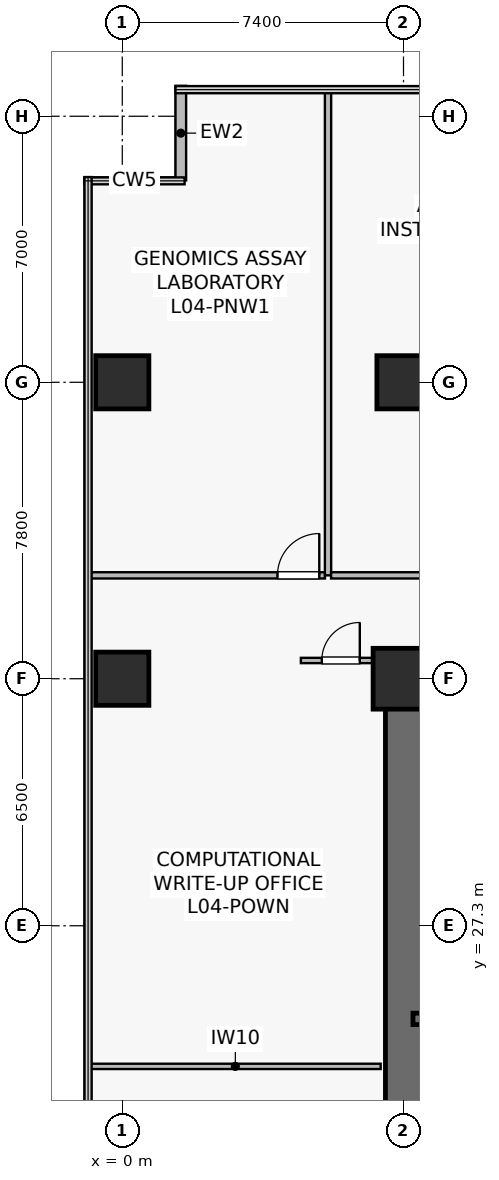
"""IFC4 building model, lengths in metres.
Left out: names, types, materials, properties, quantities, classifications, styles, units other than length and angle.
Written with IfcOpenShell. Run it as: python <this file> out.ifc"""

import sys

from ifc_helpers import new_model, si_unit, direction, frame, frame_2d, origin, origin_2d, place, context, subcontext, project, spatial, rectangle, extrude, source, transform, mapped, element, fill, save


model = new_model("IFC4")
c1 = context("Model", 3, precision=1e-05, world=origin(), true_north=direction((0.0, 1.0)))
c2 = subcontext(c1, "Body", "Model", "MODEL_VIEW")
j1 = project(units=[si_unit("LENGTHUNIT", "METRE"), si_unit("PLANEANGLEUNIT", "RADIAN")], contexts=[c1])
p1 = place(None, origin())
s1 = spatial("IfcSite", under=j1, at=p1, CompositionType="ELEMENT")
p2 = place(p1, origin())
s2 = spatial("IfcBuilding", under=s1, at=p2, CompositionType="ELEMENT")
p3 = place(p2, frame((0.0, 0.0, 15.0)))
s3 = spatial("IfcBuildingStorey", under=s2, at=p3, CompositionType="ELEMENT", Elevation=15.0)
p4 = place(p3, frame((6.925, 33.8, 0.0), z_axis=(0.0, 0.0, 1.0), x_axis=(1.0, 0.0, 0.0)))
e1 = element("IfcWall", 1, at=p4, inside=s3, PredefinedType="SHEAR", context=c2, shape_type="SweptSolid", body=[
    extrude(rectangle(XDim=15.75, YDim=0.95, at=frame_2d((7.875, 0.0))), origin(), (0.0, 0.0, 1.0), 4.45),
])
p5 = place(p4, frame((5.4, 0.0, 0.0)))
e2 = element("IfcOpeningElement", 2, at=p5, cuts=e1, PredefinedType="OPENING", context=c2, shape_type="SweptSolid", body=[
    extrude(rectangle(XDim=0.95, YDim=2.15, at=frame_2d((0.475, 1.075))), frame((0.0, 0.485, 0.0), z_axis=(0.0, -1.0, 0.0), x_axis=(1.0, 0.0, 0.0)), (0.0, 0.0, 1.0), 0.97),
])
p6 = place(p4, frame((7.915, 0.0, 0.0)))
e3 = element("IfcOpeningElement", 3, at=p6, cuts=e1, PredefinedType="OPENING", context=c2, shape_type="SweptSolid", body=[
    extrude(rectangle(XDim=0.95, YDim=2.15, at=frame_2d((0.475, 1.075))), frame((0.0, 0.485, 0.0), z_axis=(0.0, -1.0, 0.0), x_axis=(1.0, 0.0, 0.0)), (0.0, 0.0, 1.0), 0.97),
])
p7 = place(p4, frame((10.465, 0.0, 0.0)))
e4 = element("IfcOpeningElement", 4, at=p7, cuts=e1, PredefinedType="OPENING", context=c2, shape_type="SweptSolid", body=[
    extrude(rectangle(XDim=0.95, YDim=2.15, at=frame_2d((0.475, 1.075))), frame((0.0, 0.485, 0.0), z_axis=(0.0, -1.0, 0.0), x_axis=(1.0, 0.0, 0.0)), (0.0, 0.0, 1.0), 0.97),
])
p8 = place(p4, frame((13.015, 0.0, 0.0)))
e5 = element("IfcOpeningElement", 5, at=p8, cuts=e1, PredefinedType="OPENING", context=c2, shape_type="SweptSolid", body=[
    extrude(rectangle(XDim=0.95, YDim=2.15, at=frame_2d((0.475, 1.075))), frame((0.0, 0.485, 0.0), z_axis=(0.0, -1.0, 0.0), x_axis=(1.0, 0.0, 0.0)), (0.0, 0.0, 1.0), 0.97),
])
p9 = place(p3, frame((7.4, 15.275, 0.0), z_axis=(0.0, 0.0, 1.0), x_axis=(0.0, 1.0, 0.0)))
e6 = element("IfcWall", 6, at=p9, inside=s3, PredefinedType="SHEAR", context=c2, shape_type="SweptSolid", body=[
    extrude(rectangle(XDim=18.05, YDim=0.95, at=frame_2d((9.025, 0.0))), origin(), (0.0, 0.0, 1.0), 4.45),
])
p10 = place(p3, frame((7.65, 24.85, 0.0), z_axis=(0.0, 0.0, 1.0), x_axis=(1.0, 0.0, 0.0)))
e7 = element("IfcWall", 7, at=p10, inside=s3, PredefinedType="SHEAR", context=c2, shape_type="SweptSolid", body=[
    extrude(rectangle(XDim=3.8, YDim=0.3, at=frame_2d((1.9, 0.0))), origin(), (0.0, 0.0, 1.0), 4.45),
])
m1 = source(origin(), c2, "Body", "SweptSolid", [
    extrude(rectangle(XDim=1.6, YDim=1.6, at=origin_2d()), origin(), (0.0, 0.0, 1.0), 4.8),
])
p11 = place(p3, frame((7.4, 33.8, 0.0), z_axis=(0.0, 0.0, 1.0), x_axis=(1.0, 0.0, 0.0)))
e8 = element("IfcColumn", 8, at=p11, inside=s3, PredefinedType="COLUMN", context=c2, shape_type="MappedRepresentation", body=[
    mapped(m1, transform((0.0, 0.0, 0.0), scale=1.0)),
])
m2 = source(origin(), c2, "Body", "SweptSolid", [
    extrude(rectangle(XDim=1.4, YDim=1.4, at=origin_2d()), origin(), (0.0, 0.0, 1.0), 4.8),
])
for number, where, z_axis, x_axis in (
    (9, (7.4, 41.6, 0.0), (0.0, 0.0, 1.0), (1.0, 0.0, 0.0)),
    (10, (0.0, 33.8, 0.0), (0.0, 0.0, 1.0), (1.0, 0.0, 0.0)),
    (11, (0.0, 41.6, 0.0), (0.0, 0.0, 1.0), (1.0, 0.0, 0.0)),
):
    element("IfcColumn", number, at=place(p3, frame(where, z_axis=z_axis, x_axis=x_axis)), inside=s3, PredefinedType="COLUMN", context=c2, shape_type="MappedRepresentation", body=[
        mapped(m2, transform((0.0, 0.0, 0.0), scale=1.0)),
    ])
p12 = place(p3, frame((1.54, 49.4, 0.0), z_axis=(0.0, 0.0, 1.0), x_axis=(0.0, -1.0, 0.0)))
e12 = element("IfcWall", 12, at=p12, inside=s3, PredefinedType="STANDARD", context=c2, shape_type="SweptSolid", body=[
    extrude(rectangle(XDim=2.488, YDim=0.28, at=frame_2d((1.244, 0.0))), origin(), (0.0, 0.0, 1.0), 4.45),
])
p13 = place(p3, frame((-0.85, 23.6, 0.0), z_axis=(0.0, 0.0, 1.0), x_axis=(1.0, 0.0, 0.0)))
e13 = element("IfcWall", 13, at=p13, inside=s3, PredefinedType="PARTITIONING", context=c2, shape_type="SweptSolid", body=[
    extrude(rectangle(XDim=7.65, YDim=0.14, at=frame_2d((3.825, 0.0))), origin(), (0.0, 0.0, 1.0), 3.835),
])
p14 = place(p3, frame((4.7, 34.28, 0.0), z_axis=(0.0, 0.0, 1.0), x_axis=(1.0, 0.0, 0.0)))
e14 = element("IfcWall", 14, at=p14, inside=s3, PredefinedType="PARTITIONING", context=c2, shape_type="SweptSolid", body=[
    extrude(rectangle(XDim=2.1, YDim=0.14, at=frame_2d((1.05, 0.0))), origin(), (0.0, 0.0, 1.0), 4.45),
])
p15 = place(p14, frame((0.55, 0.0, 0.0)))
e15 = element("IfcOpeningElement", 15, at=p15, cuts=e14, PredefinedType="OPENING", context=c2, shape_type="SweptSolid", body=[
    extrude(rectangle(XDim=1.0, YDim=2.15, at=frame_2d((0.5, 1.075))), frame((0.0, 0.08, 0.0), z_axis=(0.0, -1.0, 0.0), x_axis=(1.0, 0.0, 0.0)), (0.0, 0.0, 1.0), 0.16),
])
p16 = place(p3, frame((-0.85, 36.52, 0.0), z_axis=(0.0, 0.0, 1.0), x_axis=(1.0, 0.0, 0.0)))
e16 = element("IfcWall", 16, at=p16, inside=s3, PredefinedType="PARTITIONING", context=c2, shape_type="SweptSolid", body=[
    extrude(rectangle(XDim=6.184, YDim=0.165, at=frame_2d((3.092, 0.0))), origin(), (0.0, 0.0, 1.0), 3.835),
])
p17 = place(p16, frame((4.934, 0.0, 0.0)))
e17 = element("IfcOpeningElement", 17, at=p17, cuts=e16, PredefinedType="OPENING", context=c2, shape_type="SweptSolid", body=[
    extrude(rectangle(XDim=1.1, YDim=2.18, at=frame_2d((0.55, 1.09))), frame((0.0, 0.093, 0.0), z_axis=(0.0, -1.0, 0.0), x_axis=(1.0, 0.0, 0.0)), (0.0, 0.0, 1.0), 0.185),
])
p18 = place(p3, frame((5.414, 36.52, 0.0), z_axis=(0.0, 0.0, 1.0), x_axis=(0.0, 1.0, 0.0)))
e18 = element("IfcWall", 18, at=p18, inside=s3, PredefinedType="PARTITIONING", context=c2, shape_type="SweptSolid", body=[
    extrude(rectangle(XDim=12.77, YDim=0.165, at=frame_2d((6.385, 0.0))), origin(), (0.0, 0.0, 1.0), 3.635),
])
p19 = place(p3, frame((5.494, 36.52, 0.0), z_axis=(0.0, 0.0, 1.0), x_axis=(1.0, 0.0, 0.0)))
e19 = element("IfcWall", 19, at=p19, inside=s3, PredefinedType="PARTITIONING", context=c2, shape_type="SweptSolid", body=[
    extrude(rectangle(XDim=7.409, YDim=0.165, at=frame_2d((3.705, 0.0))), origin(), (0.0, 0.0, 1.0), 3.735),
])
p20 = place(p19, frame((3.155, 0.0, 0.0)))
e20 = element("IfcOpeningElement", 20, at=p20, cuts=e19, PredefinedType="OPENING", context=c2, shape_type="SweptSolid", body=[
    extrude(rectangle(XDim=1.1, YDim=2.18, at=frame_2d((0.55, 1.09))), frame((0.0, 0.093, 0.0), z_axis=(0.0, -1.0, 0.0), x_axis=(1.0, 0.0, 0.0)), (0.0, 0.0, 1.0), 0.185),
])
m3 = source(origin(), c2, "Body", "SweptSolid", [
    extrude(rectangle(XDim=1.0, YDim=2.15, at=frame_2d((0.5, 1.075))), frame((0.0, 0.025, 0.0), z_axis=(0.0, -1.0, 0.0), x_axis=(1.0, 0.0, 0.0)), (0.0, 0.0, 1.0), 0.05),
])
p21 = place(p15, origin())
e21 = element("IfcDoor", 21, at=p21, inside=s3, OperationType="SINGLE_SWING_RIGHT", PredefinedType="DOOR", context=c2, shape_type="MappedRepresentation", body=[
    mapped(m3, transform((0.0, 0.0, 0.0), scale=1.0)),
])
fill(e15, e21)
m4 = source(origin(), c2, "Body", "SweptSolid", [
    extrude(rectangle(XDim=1.1, YDim=2.18, at=frame_2d((0.55, 1.09))), frame((0.0, 0.025, 0.0), z_axis=(0.0, -1.0, 0.0), x_axis=(1.0, 0.0, 0.0)), (0.0, 0.0, 1.0), 0.05),
])
p22 = place(p17, origin())
e22 = element("IfcDoor", 22, at=p22, inside=s3, OperationType="SINGLE_SWING_RIGHT", PredefinedType="DOOR", context=c2, shape_type="MappedRepresentation", body=[
    mapped(m4, transform((0.0, 0.0, 0.0), scale=1.0)),
])
fill(e17, e22)
save(model, sys.argv[1])
